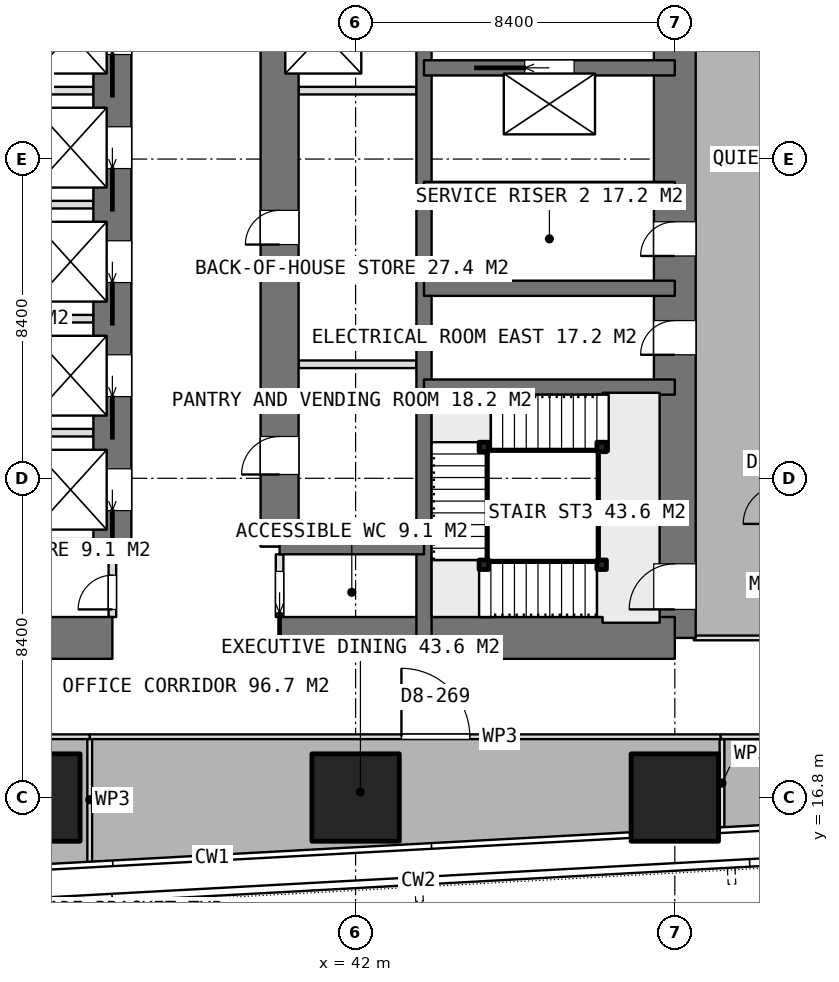
"""IFC4 building model, lengths in metres.
Left out: names, types, materials, properties, quantities, classifications, styles, units other than length and angle.
Written with IfcOpenShell. Run it as: python <this file> out.ifc"""

import sys

from ifc_helpers import new_model, si_unit, direction, frame, frame_2d, origin, origin_2d, place, context, subcontext, project, spatial, rectangle, extrude, element, fill, save


model = new_model("IFC4")
c1 = context("Model", 3, precision=1e-05, world=origin(), true_north=direction((0.0, 1.0)))
c2 = subcontext(c1, "Body", "Model", "MODEL_VIEW")
j1 = project(units=[si_unit("LENGTHUNIT", "METRE"), si_unit("PLANEANGLEUNIT", "RADIAN")], contexts=[c1])
p1 = place(None, origin())
s1 = spatial("IfcSite", under=j1, at=p1, CompositionType="ELEMENT")
p2 = place(p1, origin())
s2 = spatial("IfcBuilding", under=s1, at=p2, CompositionType="ELEMENT")
p3 = place(p2, frame((0.0, 0.0, 250.1)))
s3 = spatial("IfcBuildingStorey", under=s2, at=p3, CompositionType="ELEMENT", Elevation=250.1)
p4 = place(p3, frame((25.2, 21.0, 0.0), z_axis=(0.0, 0.0, 1.0), x_axis=(1.0, 0.0, 0.0)))
e1 = element("IfcWall", 1, at=p4, inside=s3, PredefinedType="SHEAR", context=c2, shape_type="SweptSolid", body=[
    extrude(rectangle(XDim=10.4, YDim=1.1, at=frame_2d((5.2, 0.0))), origin(), (0.0, 0.0, 1.0), 3.75),
])
p5 = place(p3, frame((40.0, 21.0, 0.0), z_axis=(0.0, 0.0, 1.0), x_axis=(1.0, 0.0, 0.0)))
e2 = element("IfcWall", 2, at=p5, inside=s3, PredefinedType="SHEAR", context=c2, shape_type="SweptSolid", body=[
    extrude(rectangle(XDim=10.4, YDim=1.1, at=frame_2d((5.2, 0.0))), origin(), (0.0, 0.0, 1.0), 3.75),
])
p6 = place(p3, frame((50.4, 21.0, 0.0), z_axis=(0.0, 0.0, 1.0), x_axis=(0.0, 1.0, 0.0)))
e3 = element("IfcWall", 3, at=p6, inside=s3, PredefinedType="SHEAR", context=c2, shape_type="SweptSolid", body=[
    extrude(rectangle(XDim=25.2, YDim=1.1, at=frame_2d((12.6, 0.0))), origin(), (0.0, 0.0, 1.0), 3.75),
])
p7 = place(p6, frame((16.2, 0.0, 0.0)))
e4 = element("IfcOpeningElement", 4, at=p7, cuts=e3, PredefinedType="OPENING", context=c2, shape_type="SweptSolid", body=[
    extrude(rectangle(XDim=1.2, YDim=2.1, at=frame_2d((0.6, 1.05))), frame((0.0, 0.56, 0.0), z_axis=(0.0, -1.0, 0.0), x_axis=(1.0, 0.0, 0.0)), (0.0, 0.0, 1.0), 1.12),
])
p8 = place(p6, frame((10.05, 0.0, 0.0)))
e5 = element("IfcOpeningElement", 5, at=p8, cuts=e3, PredefinedType="OPENING", context=c2, shape_type="SweptSolid", body=[
    extrude(rectangle(XDim=0.9, YDim=2.1, at=frame_2d((0.45, 1.05))), frame((0.0, 0.56, 0.0), z_axis=(0.0, -1.0, 0.0), x_axis=(1.0, 0.0, 0.0)), (0.0, 0.0, 1.0), 1.12),
])
p9 = place(p6, frame((7.45, 0.0, 0.0)))
e6 = element("IfcOpeningElement", 6, at=p9, cuts=e3, PredefinedType="OPENING", context=c2, shape_type="SweptSolid", body=[
    extrude(rectangle(XDim=0.9, YDim=2.1, at=frame_2d((0.45, 1.05))), frame((0.0, 0.56, 0.0), z_axis=(0.0, -1.0, 0.0), x_axis=(1.0, 0.0, 0.0)), (0.0, 0.0, 1.0), 1.12),
])
p10 = place(p6, frame((0.75, 0.0, 0.0)))
e7 = element("IfcOpeningElement", 7, at=p10, cuts=e3, PredefinedType="OPENING", context=c2, shape_type="SweptSolid", body=[
    extrude(rectangle(XDim=1.2, YDim=2.1, at=frame_2d((0.6, 1.05))), frame((0.0, 0.56, 0.0), z_axis=(0.0, -1.0, 0.0), x_axis=(1.0, 0.0, 0.0)), (0.0, 0.0, 1.0), 1.12),
])
p11 = place(p3, frame((43.8, 21.0, 0.0), z_axis=(0.0, 0.0, 1.0), x_axis=(0.0, 1.0, 0.0)))
e8 = element("IfcWall", 8, at=p11, inside=s3, PredefinedType="SHEAR", context=c2, shape_type="SweptSolid", body=[
    extrude(rectangle(XDim=25.2, YDim=0.4, at=frame_2d((12.6, 0.0))), origin(), (0.0, 0.0, 1.0), 3.75),
])
p12 = place(p3, frame((35.6, 23.4, 0.0), z_axis=(0.0, 0.0, 1.0), x_axis=(0.0, 1.0, 0.0)))
e9 = element("IfcWall", 9, at=p12, inside=s3, PredefinedType="SHEAR", context=c2, shape_type="SweptSolid", body=[
    extrude(rectangle(XDim=18.0, YDim=1.0, at=frame_2d((9.0, 0.0))), origin(), (0.0, 0.0, 1.0), 3.75),
])
p13 = place(p12, frame((0.95, 0.0, 0.0)))
e10 = element("IfcOpeningElement", 10, at=p13, cuts=e9, PredefinedType="OPENING", context=c2, shape_type="SweptSolid", body=[
    extrude(rectangle(XDim=1.1, YDim=2.1, at=frame_2d((0.55, 1.05))), frame((0.0, 0.51, 0.0), z_axis=(0.0, -1.0, 0.0), x_axis=(1.0, 0.0, 0.0)), (0.0, 0.0, 1.0), 1.02),
])
p14 = place(p12, frame((3.95, 0.0, 0.0)))
e11 = element("IfcOpeningElement", 11, at=p14, cuts=e9, PredefinedType="OPENING", context=c2, shape_type="SweptSolid", body=[
    extrude(rectangle(XDim=1.1, YDim=2.1, at=frame_2d((0.55, 1.05))), frame((0.0, 0.51, 0.0), z_axis=(0.0, -1.0, 0.0), x_axis=(1.0, 0.0, 0.0)), (0.0, 0.0, 1.0), 1.02),
])
p15 = place(p12, frame((6.95, 0.0, 0.0)))
e12 = element("IfcOpeningElement", 12, at=p15, cuts=e9, PredefinedType="OPENING", context=c2, shape_type="SweptSolid", body=[
    extrude(rectangle(XDim=1.1, YDim=2.1, at=frame_2d((0.55, 1.05))), frame((0.0, 0.51, 0.0), z_axis=(0.0, -1.0, 0.0), x_axis=(1.0, 0.0, 0.0)), (0.0, 0.0, 1.0), 1.02),
])
p16 = place(p12, frame((9.95, 0.0, 0.0)))
e13 = element("IfcOpeningElement", 13, at=p16, cuts=e9, PredefinedType="OPENING", context=c2, shape_type="SweptSolid", body=[
    extrude(rectangle(XDim=1.1, YDim=2.1, at=frame_2d((0.55, 1.05))), frame((0.0, 0.51, 0.0), z_axis=(0.0, -1.0, 0.0), x_axis=(1.0, 0.0, 0.0)), (0.0, 0.0, 1.0), 1.02),
])
p17 = place(p12, frame((12.95, 0.0, 0.0)))
e14 = element("IfcOpeningElement", 14, at=p17, cuts=e9, PredefinedType="OPENING", context=c2, shape_type="SweptSolid", body=[
    extrude(rectangle(XDim=1.1, YDim=2.1, at=frame_2d((0.55, 1.05))), frame((0.0, 0.51, 0.0), z_axis=(0.0, -1.0, 0.0), x_axis=(1.0, 0.0, 0.0)), (0.0, 0.0, 1.0), 1.02),
])
p18 = place(p12, frame((15.95, 0.0, 0.0)))
e15 = element("IfcOpeningElement", 15, at=p18, cuts=e9, PredefinedType="OPENING", context=c2, shape_type="SweptSolid", body=[
    extrude(rectangle(XDim=1.1, YDim=2.1, at=frame_2d((0.55, 1.05))), frame((0.0, 0.51, 0.0), z_axis=(0.0, -1.0, 0.0), x_axis=(1.0, 0.0, 0.0)), (0.0, 0.0, 1.0), 1.02),
])
p19 = place(p3, frame((40.0, 23.4, 0.0), z_axis=(0.0, 0.0, 1.0), x_axis=(0.0, 1.0, 0.0)))
e16 = element("IfcWall", 16, at=p19, inside=s3, PredefinedType="SHEAR", context=c2, shape_type="SweptSolid", body=[
    extrude(rectangle(XDim=18.0, YDim=1.0, at=frame_2d((9.0, 0.0))), origin(), (0.0, 0.0, 1.0), 3.75),
])
p20 = place(p19, frame((1.9, 0.0, 0.0)))
e17 = element("IfcOpeningElement", 17, at=p20, cuts=e16, PredefinedType="OPENING", context=c2, shape_type="SweptSolid", body=[
    extrude(rectangle(XDim=1.0, YDim=2.1, at=frame_2d((0.5, 1.05))), frame((0.0, 0.51, 0.0), z_axis=(0.0, -1.0, 0.0), x_axis=(1.0, 0.0, 0.0)), (0.0, 0.0, 1.0), 1.02),
])
p21 = place(p19, frame((7.95, 0.0, 0.0)))
e18 = element("IfcOpeningElement", 18, at=p21, cuts=e16, PredefinedType="OPENING", context=c2, shape_type="SweptSolid", body=[
    extrude(rectangle(XDim=0.9, YDim=2.1, at=frame_2d((0.45, 1.05))), frame((0.0, 0.51, 0.0), z_axis=(0.0, -1.0, 0.0), x_axis=(1.0, 0.0, 0.0)), (0.0, 0.0, 1.0), 1.02),
])
for number, where, z_axis, x_axis in (
    (19, (31.8, 23.4, 0.0), (0.0, 0.0, 1.0), (1.0, 0.0, 0.0)),
    (20, (40.0, 23.4, 0.0), (0.0, 0.0, 1.0), (1.0, 0.0, 0.0)),
):
    element("IfcWall", number, at=place(p3, frame(where, z_axis=z_axis, x_axis=x_axis)), inside=s3, PredefinedType="SHEAR", context=c2, shape_type="SweptSolid", body=[
        extrude(rectangle(XDim=3.8, YDim=0.4, at=frame_2d((1.9, 0.0))), origin(), (0.0, 0.0, 1.0), 3.75),
    ])
for number, where, z_axis, x_axis in (
    (21, (43.8, 27.6, 0.0), (0.0, 0.0, 1.0), (1.0, 0.0, 0.0)),
    (22, (43.8, 30.2, 0.0), (0.0, 0.0, 1.0), (1.0, 0.0, 0.0)),
    (23, (43.8, 32.8, 0.0), (0.0, 0.0, 1.0), (1.0, 0.0, 0.0)),
):
    element("IfcWall", number, at=place(p3, frame(where, z_axis=z_axis, x_axis=x_axis)), inside=s3, PredefinedType="SHEAR", context=c2, shape_type="SweptSolid", body=[
        extrude(rectangle(XDim=6.6, YDim=0.4, at=frame_2d((3.3, 0.0))), origin(), (0.0, 0.0, 1.0), 3.75),
    ])
p22 = place(p3, frame((43.8, 36.0, 0.0), z_axis=(0.0, 0.0, 1.0), x_axis=(1.0, 0.0, 0.0)))
e24 = element("IfcWall", 24, at=p22, inside=s3, PredefinedType="SHEAR", context=c2, shape_type="SweptSolid", body=[
    extrude(rectangle(XDim=6.6, YDim=0.4, at=frame_2d((3.3, 0.0))), origin(), (0.0, 0.0, 1.0), 3.75),
])
p23 = place(p22, frame((2.65, 0.0, 0.0)))
e25 = element("IfcOpeningElement", 25, at=p23, cuts=e24, PredefinedType="OPENING", context=c2, shape_type="SweptSolid", body=[
    extrude(rectangle(XDim=1.3, YDim=2.1, at=frame_2d((0.65, 1.05))), frame((0.0, 0.21, 0.0), z_axis=(0.0, -1.0, 0.0), x_axis=(1.0, 0.0, 0.0)), (0.0, 0.0, 1.0), 0.42),
])
for number, where, z_axis, x_axis in (
    (26, (33.6, 16.8, 0.0), (0.0, 0.0, 1.0), (1.0, 0.0, 0.0)),
    (27, (42.0, 16.8, 0.0), (0.0, 0.0, 1.0), (1.0, 0.0, 0.0)),
    (28, (50.4, 16.8, 0.0), (0.0, 0.0, 1.0), (1.0, 0.0, 0.0)),
):
    element("IfcColumn", number, at=place(p3, frame(where, z_axis=z_axis, x_axis=x_axis)), inside=s3, PredefinedType="COLUMN", context=c2, shape_type="SweptSolid", body=[
        extrude(rectangle(XDim=2.3, YDim=2.3, at=origin_2d()), origin(), (0.0, 0.0, 1.0), 3.75),
    ])
for number, where, z_axis, x_axis in (
    (29, (32.0, 26.4, 0.0), (0.0, 0.0, 1.0), (1.0, 0.0, 0.0)),
    (30, (32.0, 29.4, 0.0), (0.0, 0.0, 1.0), (1.0, 0.0, 0.0)),
    (31, (32.0, 32.4, 0.0), (0.0, 0.0, 1.0), (1.0, 0.0, 0.0)),
    (32, (32.0, 35.4, 0.0), (0.0, 0.0, 1.0), (1.0, 0.0, 0.0)),
    (33, (40.5, 35.4, 0.0), (0.0, 0.0, 1.0), (1.0, 0.0, 0.0)),
):
    element("IfcWall", number, at=place(p3, frame(where, z_axis=z_axis, x_axis=x_axis)), inside=s3, PredefinedType="PARTITIONING", context=c2, shape_type="SweptSolid", body=[
        extrude(rectangle(XDim=3.1, YDim=0.2, at=frame_2d((1.55, 0.0))), origin(), (0.0, 0.0, 1.0), 3.5),
    ])
p24 = place(p3, frame((40.0, 21.55, 0.0), z_axis=(0.0, 0.0, 1.0), x_axis=(0.0, 1.0, 0.0)))
e34 = element("IfcWall", 34, at=p24, inside=s3, PredefinedType="PARTITIONING", context=c2, shape_type="SweptSolid", body=[
    extrude(rectangle(XDim=1.65, YDim=0.2, at=frame_2d((0.825, 0.0))), origin(), (0.0, 0.0, 1.0), 3.5),
])
p25 = place(p24, frame((0.1, 0.0, 0.0)))
e35 = element("IfcOpeningElement", 35, at=p25, cuts=e34, PredefinedType="OPENING", context=c2, shape_type="SweptSolid", body=[
    extrude(rectangle(XDim=1.1, YDim=2.1, at=frame_2d((0.55, 1.05))), frame((0.0, 0.11, 0.0), z_axis=(0.0, -1.0, 0.0), x_axis=(1.0, 0.0, 0.0)), (0.0, 0.0, 1.0), 0.22),
])
p26 = place(p3, frame((35.6, 21.55, 0.0), z_axis=(0.0, 0.0, 1.0), x_axis=(0.0, 1.0, 0.0)))
e36 = element("IfcWall", 36, at=p26, inside=s3, PredefinedType="PARTITIONING", context=c2, shape_type="SweptSolid", body=[
    extrude(rectangle(XDim=1.65, YDim=0.2, at=frame_2d((0.825, 0.0))), origin(), (0.0, 0.0, 1.0), 3.5),
])
p27 = place(p26, frame((0.2, 0.0, 0.0)))
e37 = element("IfcOpeningElement", 37, at=p27, cuts=e36, PredefinedType="OPENING", context=c2, shape_type="SweptSolid", body=[
    extrude(rectangle(XDim=0.9, YDim=2.1, at=frame_2d((0.45, 1.05))), frame((0.0, 0.11, 0.0), z_axis=(0.0, -1.0, 0.0), x_axis=(1.0, 0.0, 0.0)), (0.0, 0.0, 1.0), 0.22),
])
p28 = place(p3, frame((40.5, 28.2, 0.0), z_axis=(0.0, 0.0, 1.0), x_axis=(1.0, 0.0, 0.0)))
e38 = element("IfcWall", 38, at=p28, inside=s3, PredefinedType="PARTITIONING", context=c2, shape_type="SweptSolid", body=[
    extrude(rectangle(XDim=3.1, YDim=0.2, at=frame_2d((1.55, 0.0))), origin(), (0.0, 0.0, 1.0), 3.5),
])
p29 = place(p3, frame((53.124, 21.0, 0.0), z_axis=(0.0, 0.0, 1.0), x_axis=(-1.0, 0.0, 0.0)))
e39 = element("IfcWall", 39, at=p29, inside=s3, PredefinedType="PARTITIONING", context=c2, shape_type="SweptSolid", body=[
    extrude(rectangle(XDim=2.224, YDim=0.125, at=frame_2d((1.112, 0.0))), origin(), (0.0, 0.0, 1.0), 3.5),
])
p30 = place(p3, frame((35.004, 15.087, 0.0), z_axis=(0.0, 0.0, 1.0), x_axis=(0.0, 1.0, 0.0)))
e40 = element("IfcWall", 40, at=p30, inside=s3, PredefinedType="PARTITIONING", context=c2, shape_type="SweptSolid", body=[
    extrude(rectangle(XDim=3.313, YDim=0.125, at=frame_2d((1.656, 0.0))), origin(), (0.0, 0.0, 1.0), 3.5),
])
p31 = place(p3, frame((35.004, 18.4, 0.0), z_axis=(0.0, 0.0, 1.0), x_axis=(1.0, 0.0, 0.0)))
e41 = element("IfcWall", 41, at=p31, inside=s3, PredefinedType="PARTITIONING", context=c2, shape_type="SweptSolid", body=[
    extrude(rectangle(XDim=16.604, YDim=0.125, at=frame_2d((8.302, 0.0))), origin(), (0.0, 0.0, 1.0), 3.5),
])
p32 = place(p31, frame((8.202, 0.0, 0.0)))
e42 = element("IfcOpeningElement", 42, at=p32, cuts=e41, PredefinedType="OPENING", context=c2, shape_type="SweptSolid", body=[
    extrude(rectangle(XDim=1.8, YDim=2.1, at=frame_2d((0.9, 1.05))), frame((0.0, 0.073, 0.0), z_axis=(0.0, -1.0, 0.0), x_axis=(1.0, 0.0, 0.0)), (0.0, 0.0, 1.0), 0.145),
])
p33 = place(p3, frame((51.642, 18.337, 0.0), z_axis=(0.0, 0.0, 1.0), x_axis=(0.0, -1.0, 0.0)))
e43 = element("IfcWall", 43, at=p33, inside=s3, PredefinedType="PARTITIONING", context=c2, shape_type="SweptSolid", body=[
    extrude(rectangle(XDim=2.314, YDim=0.125, at=frame_2d((1.157, 0.0))), origin(), (0.0, 0.0, 1.0), 3.5),
])
p34 = place(p3, frame((51.608, 18.4, 0.0), z_axis=(0.0, 0.0, 1.0), x_axis=(1.0, 0.0, 0.0)))
e44 = element("IfcWall", 44, at=p34, inside=s3, PredefinedType="PARTITIONING", context=c2, shape_type="SweptSolid", body=[
    extrude(rectangle(XDim=4.792, YDim=0.125, at=frame_2d((2.396, 0.0))), origin(), (0.0, 0.0, 1.0), 3.5),
])
p35 = place(p34, frame((1.896, 0.0, 0.0)))
e45 = element("IfcOpeningElement", 45, at=p35, cuts=e44, PredefinedType="OPENING", context=c2, shape_type="SweptSolid", body=[
    extrude(rectangle(XDim=1.0, YDim=2.1, at=frame_2d((0.5, 1.05))), frame((0.0, 0.073, 0.0), z_axis=(0.0, -1.0, 0.0), x_axis=(1.0, 0.0, 0.0)), (0.0, 0.0, 1.0), 0.145),
])
p36 = place(p3, frame((19.2, 18.4, 0.0), z_axis=(0.0, 0.0, 1.0), x_axis=(1.0, 0.0, 0.0)))
e46 = element("IfcWall", 46, at=p36, inside=s3, PredefinedType="PARTITIONING", context=c2, shape_type="SweptSolid", body=[
    extrude(rectangle(XDim=15.803, YDim=0.125, at=frame_2d((7.901, 0.0))), origin(), (0.0, 0.0, 1.0), 3.5),
])
p37 = place(p36, frame((7.201, 0.0, 0.0)))
e47 = element("IfcOpeningElement", 47, at=p37, cuts=e46, PredefinedType="OPENING", context=c2, shape_type="SweptSolid", body=[
    extrude(rectangle(XDim=1.8, YDim=2.1, at=frame_2d((0.9, 1.05))), frame((0.0, 0.073, 0.0), z_axis=(0.0, -1.0, 0.0), x_axis=(1.0, 0.0, 0.0)), (0.0, 0.0, 1.0), 0.145),
])
for number, where, z_axis, x_axis in (
    (48, (48.475, 22.925, 0.0), (0.0, 0.0, 1.0), (1.0, 0.0, 0.0)),
    (49, (45.375, 22.925, 0.0), (0.0, 0.0, 1.0), (1.0, 0.0, 0.0)),
    (50, (45.375, 26.025, 0.0), (0.0, 0.0, 1.0), (1.0, 0.0, 0.0)),
    (51, (48.475, 26.025, 0.0), (0.0, 0.0, 1.0), (1.0, 0.0, 0.0)),
):
    element("IfcColumn", number, at=place(p3, frame(where, z_axis=z_axis, x_axis=x_axis)), inside=s3, PredefinedType="COLUMN", context=c2, shape_type="SweptSolid", body=[
        extrude(rectangle(XDim=0.25, YDim=0.25, at=origin_2d()), origin(), (0.0, 0.0, 1.0), 3.75),
    ])
p38 = place(p8, origin())
e52 = element("IfcDoor", 52, at=p38, inside=s3, OperationType="SINGLE_SWING_LEFT", PredefinedType="DOOR", context=c2, shape_type="SweptSolid", body=[
    extrude(rectangle(XDim=0.9, YDim=2.1, at=frame_2d((0.45, 1.05))), frame((0.0, 0.025, 0.0), z_axis=(0.0, -1.0, 0.0), x_axis=(1.0, 0.0, 0.0)), (0.0, 0.0, 1.0), 0.05),
])
fill(e5, e52)
p39 = place(p9, origin())
e53 = element("IfcDoor", 53, at=p39, inside=s3, OperationType="SINGLE_SWING_LEFT", PredefinedType="DOOR", context=c2, shape_type="SweptSolid", body=[
    extrude(rectangle(XDim=0.9, YDim=2.1, at=frame_2d((0.45, 1.05))), frame((0.0, 0.025, 0.0), z_axis=(0.0, -1.0, 0.0), x_axis=(1.0, 0.0, 0.0)), (0.0, 0.0, 1.0), 0.05),
])
fill(e6, e53)
p40 = place(p25, origin())
e54 = element("IfcDoor", 54, at=p40, inside=s3, OperationType="SLIDING_TO_LEFT", PredefinedType="DOOR", context=c2, shape_type="SweptSolid", body=[
    extrude(rectangle(XDim=1.1, YDim=2.1, at=frame_2d((0.55, 1.05))), frame((0.0, 0.025, 0.0), z_axis=(0.0, -1.0, 0.0), x_axis=(1.0, 0.0, 0.0)), (0.0, 0.0, 1.0), 0.05),
])
fill(e35, e54)
p41 = place(p27, origin())
e55 = element("IfcDoor", 55, at=p41, inside=s3, OperationType="SINGLE_SWING_LEFT", PredefinedType="DOOR", context=c2, shape_type="SweptSolid", body=[
    extrude(rectangle(XDim=0.9, YDim=2.1, at=frame_2d((0.45, 1.05))), frame((0.0, 0.025, 0.0), z_axis=(0.0, -1.0, 0.0), x_axis=(1.0, 0.0, 0.0)), (0.0, 0.0, 1.0), 0.05),
])
fill(e37, e55)
p42 = place(p20, origin())
e56 = element("IfcDoor", 56, at=p42, inside=s3, OperationType="SINGLE_SWING_LEFT", PredefinedType="DOOR", context=c2, shape_type="SweptSolid", body=[
    extrude(rectangle(XDim=1.0, YDim=2.1, at=frame_2d((0.5, 1.05))), frame((0.0, 0.025, 0.0), z_axis=(0.0, -1.0, 0.0), x_axis=(1.0, 0.0, 0.0)), (0.0, 0.0, 1.0), 0.05),
])
fill(e17, e56)
p43 = place(p21, origin())
e57 = element("IfcDoor", 57, at=p43, inside=s3, OperationType="SINGLE_SWING_LEFT", PredefinedType="DOOR", context=c2, shape_type="SweptSolid", body=[
    extrude(rectangle(XDim=0.9, YDim=2.1, at=frame_2d((0.45, 1.05))), frame((0.0, 0.025, 0.0), z_axis=(0.0, -1.0, 0.0), x_axis=(1.0, 0.0, 0.0)), (0.0, 0.0, 1.0), 0.05),
])
fill(e18, e57)
p44 = place(p13, origin())
e58 = element("IfcDoor", 58, at=p44, inside=s3, OperationType="SLIDING_TO_LEFT", PredefinedType="USERDEFINED", context=c2, shape_type="SweptSolid", body=[
    extrude(rectangle(XDim=1.1, YDim=2.1, at=frame_2d((0.55, 1.05))), frame((0.0, 0.025, 0.0), z_axis=(0.0, -1.0, 0.0), x_axis=(1.0, 0.0, 0.0)), (0.0, 0.0, 1.0), 0.05),
])
fill(e10, e58)
p45 = place(p14, origin())
e59 = element("IfcDoor", 59, at=p45, inside=s3, OperationType="SLIDING_TO_LEFT", PredefinedType="USERDEFINED", context=c2, shape_type="SweptSolid", body=[
    extrude(rectangle(XDim=1.1, YDim=2.1, at=frame_2d((0.55, 1.05))), frame((0.0, 0.025, 0.0), z_axis=(0.0, -1.0, 0.0), x_axis=(1.0, 0.0, 0.0)), (0.0, 0.0, 1.0), 0.05),
])
fill(e11, e59)
p46 = place(p15, origin())
e60 = element("IfcDoor", 60, at=p46, inside=s3, OperationType="SLIDING_TO_LEFT", PredefinedType="USERDEFINED", context=c2, shape_type="SweptSolid", body=[
    extrude(rectangle(XDim=1.1, YDim=2.1, at=frame_2d((0.55, 1.05))), frame((0.0, 0.025, 0.0), z_axis=(0.0, -1.0, 0.0), x_axis=(1.0, 0.0, 0.0)), (0.0, 0.0, 1.0), 0.05),
])
fill(e12, e60)
p47 = place(p16, origin())
e61 = element("IfcDoor", 61, at=p47, inside=s3, OperationType="SLIDING_TO_LEFT", PredefinedType="USERDEFINED", context=c2, shape_type="SweptSolid", body=[
    extrude(rectangle(XDim=1.1, YDim=2.1, at=frame_2d((0.55, 1.05))), frame((0.0, 0.025, 0.0), z_axis=(0.0, -1.0, 0.0), x_axis=(1.0, 0.0, 0.0)), (0.0, 0.0, 1.0), 0.05),
])
fill(e13, e61)
p48 = place(p17, origin())
e62 = element("IfcDoor", 62, at=p48, inside=s3, OperationType="SLIDING_TO_LEFT", PredefinedType="USERDEFINED", context=c2, shape_type="SweptSolid", body=[
    extrude(rectangle(XDim=1.1, YDim=2.1, at=frame_2d((0.55, 1.05))), frame((0.0, 0.025, 0.0), z_axis=(0.0, -1.0, 0.0), x_axis=(1.0, 0.0, 0.0)), (0.0, 0.0, 1.0), 0.05),
])
fill(e14, e62)
p49 = place(p23, origin())
e63 = element("IfcDoor", 63, at=p49, inside=s3, OperationType="SLIDING_TO_LEFT", PredefinedType="USERDEFINED", context=c2, shape_type="SweptSolid", body=[
    extrude(rectangle(XDim=1.3, YDim=2.1, at=frame_2d((0.65, 1.05))), frame((0.0, 0.025, 0.0), z_axis=(0.0, -1.0, 0.0), x_axis=(1.0, 0.0, 0.0)), (0.0, 0.0, 1.0), 0.05),
])
fill(e25, e63)
p50 = place(p32, origin())
e64 = element("IfcDoor", 64, at=p50, inside=s3, OperationType="DOUBLE_DOOR_SINGLE_SWING", PredefinedType="DOOR", context=c2, shape_type="SweptSolid", body=[
    extrude(rectangle(XDim=1.8, YDim=2.1, at=frame_2d((0.9, 1.05))), frame((0.0, 0.025, 0.0), z_axis=(0.0, -1.0, 0.0), x_axis=(1.0, 0.0, 0.0)), (0.0, 0.0, 1.0), 0.05),
])
fill(e42, e64)
p51 = place(p10, origin())
e65 = element("IfcDoor", 65, at=p51, inside=s3, OperationType="SINGLE_SWING_RIGHT", PredefinedType="DOOR", context=c2, shape_type="SweptSolid", body=[
    extrude(rectangle(XDim=1.2, YDim=2.1, at=frame_2d((0.6, 1.05))), frame((0.0, 0.025, 0.0), z_axis=(0.0, -1.0, 0.0), x_axis=(1.0, 0.0, 0.0)), (0.0, 0.0, 1.0), 0.05),
])
fill(e7, e65)
save(model, sys.argv[1])
